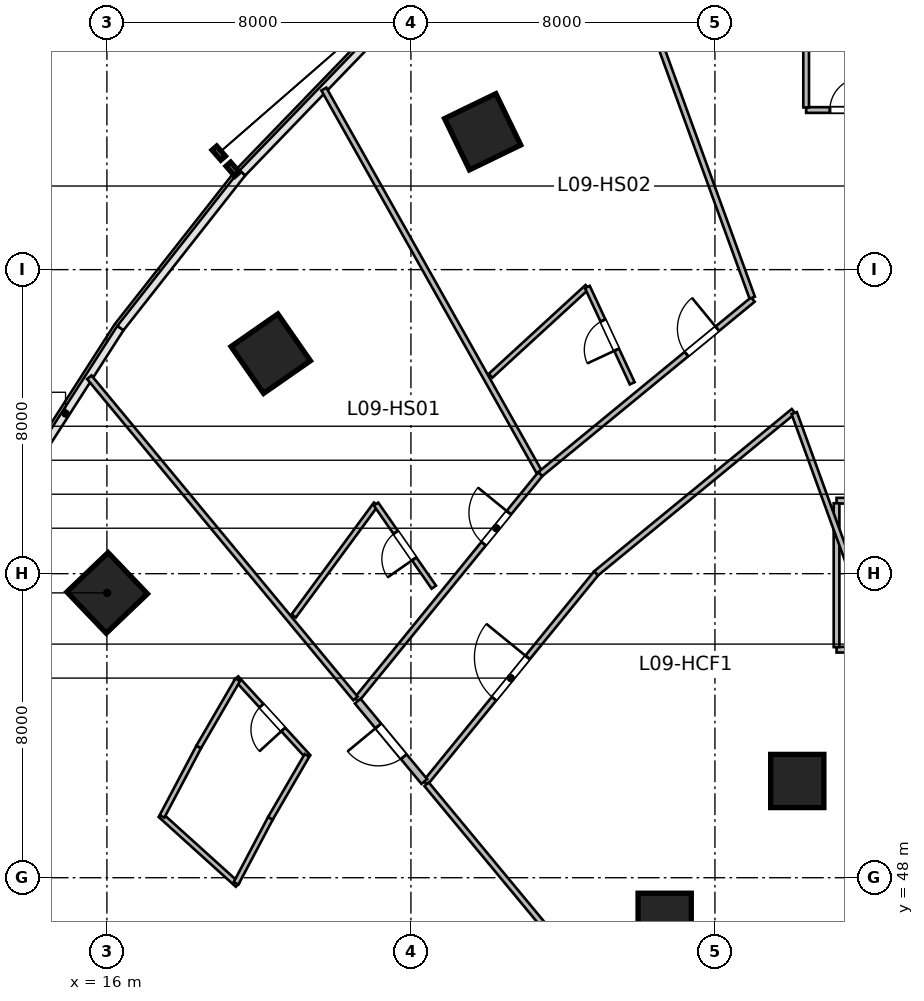
"""IFC4 building model, lengths in metres.
Left out: names, types, materials, properties, quantities, classifications, styles, units other than length and angle.
Written with IfcOpenShell. Run it as: python <this file> out.ifc"""

import sys

from ifc_helpers import new_model, si_unit, direction, frame, frame_2d, origin, origin_2d, place, context, subcontext, project, spatial, rectangle, circle, extrude, source, transform, mapped, element, fill, save


model = new_model("IFC4")
c1 = context("Model", 3, precision=1e-05, world=origin(), true_north=direction((0.0, 1.0)))
c2 = subcontext(c1, "Body", "Model", "MODEL_VIEW")
j1 = project(units=[si_unit("LENGTHUNIT", "METRE"), si_unit("PLANEANGLEUNIT", "RADIAN")], contexts=[c1])
p1 = place(None, origin())
s1 = spatial("IfcSite", under=j1, at=p1, CompositionType="ELEMENT")
p2 = place(p1, origin())
s2 = spatial("IfcBuilding", under=s1, at=p2, CompositionType="ELEMENT")
p3 = place(p2, frame((0.0, 0.0, 46.2)))
s3 = spatial("IfcBuildingStorey", under=s2, at=p3, CompositionType="ELEMENT", Elevation=46.2)
m1 = source(origin(), c2, "Body", "SweptSolid", [
    extrude(rectangle(XDim=1.5, YDim=1.5, at=origin_2d()), origin(), (0.0, 0.0, 1.0), 3.6),
])
p4 = place(p3, frame((16.007, 55.494, 0.0), z_axis=(0.0, 0.0, 1.0), x_axis=(-0.690756218984, 0.723087716626, 0.0)))
e1 = element("IfcColumn", 1, at=p4, inside=s3, PredefinedType="COLUMN", context=c2, shape_type="MappedRepresentation", body=[
    mapped(m1, transform((0.0, 0.0, 0.0), scale=1.0)),
])
m2 = source(origin(), c2, "Body", "SweptSolid", [
    extrude(circle(Radius=0.7, at=origin_2d()), origin(), (0.0, 0.0, 1.0), 3.6),
])
p5 = place(p3, frame((30.677, 46.892, 0.0), z_axis=(0.0, 0.0, 1.0), x_axis=(-0.571143442153, 0.820850271661, 0.0)))
e2 = element("IfcColumn", 2, at=p5, inside=s3, PredefinedType="COLUMN", context=c2, shape_type="MappedRepresentation", body=[
    mapped(m2, transform((0.0, 0.0, 0.0), scale=1.0)),
])
p6 = place(p3, frame((20.311, 61.789, 0.0), z_axis=(0.0, 0.0, 1.0), x_axis=(-0.571143442153, 0.820850271661, 0.0)))
e3 = element("IfcColumn", 3, at=p6, inside=s3, PredefinedType="COLUMN", context=c2, shape_type="MappedRepresentation", body=[
    mapped(m1, transform((0.0, 0.0, 0.0), scale=1.0)),
])
p7 = place(p3, frame((34.166, 50.545, 0.0), z_axis=(0.0, 0.0, 1.0), x_axis=(-0.436173672171, 0.899862504889, 0.0)))
e4 = element("IfcColumn", 4, at=p7, inside=s3, PredefinedType="COLUMN", context=c2, shape_type="MappedRepresentation", body=[
    mapped(m2, transform((0.0, 0.0, 0.0), scale=1.0)),
])
p8 = place(p3, frame((25.888, 67.627, 0.0), z_axis=(0.0, 0.0, 1.0), x_axis=(-0.436173672171, 0.899862504889, 0.0)))
e5 = element("IfcColumn", 5, at=p8, inside=s3, PredefinedType="COLUMN", context=c2, shape_type="MappedRepresentation", body=[
    mapped(m1, transform((0.0, 0.0, 0.0), scale=1.0)),
])
m3 = source(origin(), c2, "Body", "SweptSolid", [
    extrude(rectangle(XDim=2.1, YDim=0.15, at=frame_2d((1.05, 0.0))), origin(), (0.0, 0.0, 1.0), 3.36),
])
p9 = place(p3, frame((34.4, 68.2, 0.0), z_axis=(0.0, 0.0, 1.0), x_axis=(1.0, 0.0, 0.0)))
e6 = element("IfcWall", 6, at=p9, inside=s3, PredefinedType="PARTITIONING", context=c2, shape_type="MappedRepresentation", body=[
    mapped(m3, transform((0.0, 0.0, 0.0), scale=1.0)),
])
p10 = place(p9, frame((0.625, 0.0, 0.0)))
e7 = element("IfcOpeningElement", 7, at=p10, cuts=e6, PredefinedType="OPENING", context=c2, shape_type="SweptSolid", body=[
    extrude(rectangle(XDim=0.85, YDim=2.1, at=frame_2d((0.425, 1.05))), frame((0.0, 0.085, 0.0), z_axis=(0.0, -1.0, 0.0), x_axis=(1.0, 0.0, 0.0)), (0.0, 0.0, 1.0), 0.17),
])
m4 = source(origin(), c2, "Body", "SweptSolid", [
    extrude(rectangle(XDim=3.845, YDim=0.15, at=frame_2d((1.922, 0.0))), origin(), (0.0, 0.0, 1.0), 3.36),
])
p11 = place(p3, frame((34.4, 68.268, 0.0), z_axis=(0.0, 0.0, 1.0), x_axis=(0.0, 1.0, 0.0)))
e8 = element("IfcWall", 8, at=p11, inside=s3, PredefinedType="PARTITIONING", context=c2, shape_type="MappedRepresentation", body=[
    mapped(m4, transform((0.0, 0.0, 0.0), scale=1.0)),
])
m5 = source(origin(), c2, "Body", "SweptSolid", [
    extrude(rectangle(XDim=6.6, YDim=0.15, at=frame_2d((3.3, 0.0))), origin(), (0.0, 0.0, 1.0), 2.803),
])
p12 = place(p3, frame((35.2, 54.0, 0.0), z_axis=(0.0, 0.0, 1.0), x_axis=(1.0, 0.0, 0.0)))
e9 = element("IfcWall", 9, at=p12, inside=s3, PredefinedType="PARTITIONING", context=c2, shape_type="MappedRepresentation", body=[
    mapped(m5, transform((0.0, 0.0, 0.0), scale=1.0)),
])
m6 = source(origin(), c2, "Body", "SweptSolid", [
    extrude(rectangle(XDim=6.6, YDim=0.15, at=frame_2d((3.3, 0.0))), origin(), (0.0, 0.0, 1.0), 3.36),
])
p13 = place(p3, frame((35.2, 57.92, 0.0), z_axis=(0.0, 0.0, 1.0), x_axis=(1.0, 0.0, 0.0)))
e10 = element("IfcWall", 10, at=p13, inside=s3, PredefinedType="PARTITIONING", context=c2, shape_type="MappedRepresentation", body=[
    mapped(m6, transform((0.0, 0.0, 0.0), scale=1.0)),
])
p14 = place(p13, frame((2.85, 0.0, 0.0)))
e11 = element("IfcOpeningElement", 11, at=p14, cuts=e10, PredefinedType="OPENING", context=c2, shape_type="SweptSolid", body=[
    extrude(rectangle(XDim=0.9, YDim=2.1, at=frame_2d((0.45, 1.05))), frame((0.0, 0.085, 0.0), z_axis=(0.0, -1.0, 0.0), x_axis=(1.0, 0.0, 0.0)), (0.0, 0.0, 1.0), 0.17),
])
m7 = source(origin(), c2, "Body", "SweptSolid", [
    extrude(rectangle(XDim=3.785, YDim=0.15, at=frame_2d((1.893, 0.0))), origin(), (0.0, 0.0, 1.0), 3.36),
])
p15 = place(p3, frame((35.2, 54.067, 0.0), z_axis=(0.0, 0.0, 1.0), x_axis=(0.0, 1.0, 0.0)))
e12 = element("IfcWall", 12, at=p15, inside=s3, PredefinedType="PARTITIONING", context=c2, shape_type="MappedRepresentation", body=[
    mapped(m7, transform((0.0, 0.0, 0.0), scale=1.0)),
])
m8 = source(origin(), c2, "Body", "SweptSolid", [
    extrude(rectangle(XDim=7.659, YDim=0.15, at=frame_2d((3.829, 0.0))), origin(), (0.0, 0.0, 1.0), 3.36),
])
p16 = place(p3, frame((22.57, 52.683, 0.0), z_axis=(0.0, 0.0, 1.0), x_axis=(0.631489868862, 0.775384127723, 0.0)))
e13 = element("IfcWall", 13, at=p16, inside=s3, PredefinedType="PARTITIONING", context=c2, shape_type="MappedRepresentation", body=[
    mapped(m8, transform((0.0, 0.0, 0.0), scale=1.0)),
])
p17 = place(p16, frame((5.295, 0.0, 0.0)))
e14 = element("IfcOpeningElement", 14, at=p17, cuts=e13, PredefinedType="OPENING", context=c2, shape_type="SweptSolid", body=[
    extrude(rectangle(XDim=1.05, YDim=2.15, at=frame_2d((0.525, 1.075))), frame((0.0, 0.085, 0.0), z_axis=(0.0, -1.0, 0.0), x_axis=(1.0, 0.0, 0.0)), (0.0, 0.0, 1.0), 0.17),
])
m9 = source(origin(), c2, "Body", "SweptSolid", [
    extrude(rectangle(XDim=10.975, YDim=0.15, at=frame_2d((5.487, 0.0))), origin(), (0.0, 0.0, 1.0), 3.36),
])
p18 = place(p3, frame((22.54, 52.719, 0.0), z_axis=(0.0, 0.0, 1.0), x_axis=(-0.638125265812, 0.769932558821, 0.0)))
e15 = element("IfcWall", 15, at=p18, inside=s3, PredefinedType="PARTITIONING", context=c2, shape_type="MappedRepresentation", body=[
    mapped(m9, transform((0.0, 0.0, 0.0), scale=1.0)),
])
m10 = source(origin(), c2, "Body", "SweptSolid", [
    extrude(rectangle(XDim=11.573, YDim=0.15, at=frame_2d((5.786, 0.0))), origin(), (0.0, 0.0, 1.0), 3.36),
])
p19 = place(p3, frame((27.382, 58.664, 0.0), z_axis=(0.0, 0.0, 1.0), x_axis=(-0.490161073951, 0.871631872744, 0.0)))
e16 = element("IfcWall", 16, at=p19, inside=s3, PredefinedType="PARTITIONING", context=c2, shape_type="MappedRepresentation", body=[
    mapped(m10, transform((0.0, 0.0, 0.0), scale=1.0)),
])
m11 = source(origin(), c2, "Body", "SweptSolid", [
    extrude(rectangle(XDim=3.656, YDim=0.14, at=frame_2d((1.828, 0.0))), origin(), (0.0, 0.0, 1.0), 3.36),
])
p20 = place(p3, frame((20.915, 54.886, 0.0), z_axis=(0.0, 0.0, 1.0), x_axis=(0.592700141555, 0.805423206892, 0.0)))
e17 = element("IfcWall", 17, at=p20, inside=s3, PredefinedType="PARTITIONING", context=c2, shape_type="MappedRepresentation", body=[
    mapped(m11, transform((0.0, 0.0, 0.0), scale=1.0)),
])
m12 = source(origin(), c2, "Body", "SweptSolid", [
    extrude(rectangle(XDim=2.663, YDim=0.14, at=frame_2d((1.332, 0.0))), origin(), (0.0, 0.0, 1.0), 2.644),
])
p21 = place(p3, frame((24.603, 55.645, 0.0), z_axis=(0.0, 0.0, 1.0), x_axis=(-0.570905989724, 0.821015438891, 0.0)))
e18 = element("IfcWall", 18, at=p21, inside=s3, PredefinedType="PARTITIONING", context=c2, shape_type="MappedRepresentation", body=[
    mapped(m12, transform((0.0, 0.0, 0.0), scale=1.0)),
])
p22 = place(p21, frame((0.906, 0.0, 0.0)))
e19 = element("IfcOpeningElement", 19, at=p22, cuts=e18, PredefinedType="OPENING", context=c2, shape_type="SweptSolid", body=[
    extrude(rectangle(XDim=0.85, YDim=2.05, at=frame_2d((0.425, 1.025))), frame((0.0, 0.08, 0.0), z_axis=(0.0, -1.0, 0.0), x_axis=(1.0, 0.0, 0.0)), (0.0, 0.0, 1.0), 0.16),
])
m13 = source(origin(), c2, "Body", "SweptSolid", [
    extrude(rectangle(XDim=7.237, YDim=0.15, at=frame_2d((3.618, 0.0))), origin(), (0.0, 0.0, 1.0), 3.36),
])
p23 = place(p3, frame((27.406, 58.621, 0.0), z_axis=(0.0, 0.0, 1.0), x_axis=(0.772813707793, 0.634632943557, 0.0)))
e20 = element("IfcWall", 20, at=p23, inside=s3, PredefinedType="PARTITIONING", context=c2, shape_type="MappedRepresentation", body=[
    mapped(m13, transform((0.0, 0.0, 0.0), scale=1.0)),
])
p24 = place(p23, frame((4.975, 0.0, 0.0)))
e21 = element("IfcOpeningElement", 21, at=p24, cuts=e20, PredefinedType="OPENING", context=c2, shape_type="SweptSolid", body=[
    extrude(rectangle(XDim=1.05, YDim=2.15, at=frame_2d((0.525, 1.075))), frame((0.0, 0.085, 0.0), z_axis=(0.0, -1.0, 0.0), x_axis=(1.0, 0.0, 0.0)), (0.0, 0.0, 1.0), 0.17),
])
m14 = source(origin(), c2, "Body", "SweptSolid", [
    extrude(rectangle(XDim=12.088, YDim=0.15, at=frame_2d((6.044, 0.0))), origin(), (0.0, 0.0, 1.0), 3.36),
])
p25 = place(p3, frame((32.981, 63.262, 0.0), z_axis=(0.0, 0.0, 1.0), x_axis=(-0.34203007529, 0.939689005787, 0.0)))
e22 = element("IfcWall", 22, at=p25, inside=s3, PredefinedType="PARTITIONING", context=c2, shape_type="MappedRepresentation", body=[
    mapped(m14, transform((0.0, 0.0, 0.0), scale=1.0)),
])
m15 = source(origin(), c2, "Body", "SweptSolid", [
    extrude(rectangle(XDim=3.456, YDim=0.14, at=frame_2d((1.728, 0.0))), origin(), (0.0, 0.0, 1.0), 3.36),
])
p26 = place(p3, frame((26.095, 61.207, 0.0), z_axis=(0.0, 0.0, 1.0), x_axis=(0.736860870293, 0.676044420013, 0.0)))
e23 = element("IfcWall", 23, at=p26, inside=s3, PredefinedType="PARTITIONING", context=c2, shape_type="MappedRepresentation", body=[
    mapped(m15, transform((0.0, 0.0, 0.0), scale=1.0)),
])
m16 = source(origin(), c2, "Body", "SweptSolid", [
    extrude(rectangle(XDim=2.796, YDim=0.14, at=frame_2d((1.398, 0.0))), origin(), (0.0, 0.0, 1.0), 3.36),
])
p27 = place(p3, frame((29.823, 61.009, 0.0), z_axis=(0.0, 0.0, 1.0), x_axis=(-0.422316594955, 0.906448395456, 0.0)))
e24 = element("IfcWall", 24, at=p27, inside=s3, PredefinedType="PARTITIONING", context=c2, shape_type="MappedRepresentation", body=[
    mapped(m16, transform((0.0, 0.0, 0.0), scale=1.0)),
])
p28 = place(p27, frame((0.973, 0.0, 0.0)))
e25 = element("IfcOpeningElement", 25, at=p28, cuts=e24, PredefinedType="OPENING", context=c2, shape_type="SweptSolid", body=[
    extrude(rectangle(XDim=0.85, YDim=2.05, at=frame_2d((0.425, 1.025))), frame((0.0, 0.08, 0.0), z_axis=(0.0, -1.0, 0.0), x_axis=(1.0, 0.0, 0.0)), (0.0, 0.0, 1.0), 0.16),
])
m17 = source(origin(), c2, "Body", "SweptSolid", [
    extrude(rectangle(XDim=7.113, YDim=0.15, at=frame_2d((3.556, 0.0))), origin(), (0.0, 0.0, 1.0), 3.36),
])
p29 = place(p3, frame((24.383, 50.495, 0.0), z_axis=(0.0, 0.0, 1.0), x_axis=(0.63149032532, 0.775383755974, 0.0)))
e26 = element("IfcWall", 26, at=p29, inside=s3, PredefinedType="PARTITIONING", context=c2, shape_type="MappedRepresentation", body=[
    mapped(m17, transform((0.0, 0.0, 0.0), scale=1.0)),
])
p30 = place(p29, frame((2.856, 0.0, 0.0)))
e27 = element("IfcOpeningElement", 27, at=p30, cuts=e26, PredefinedType="OPENING", context=c2, shape_type="SweptSolid", body=[
    extrude(rectangle(XDim=1.4, YDim=2.15, at=frame_2d((0.7, 1.075))), frame((0.0, 0.085, 0.0), z_axis=(0.0, -1.0, 0.0), x_axis=(1.0, 0.0, 0.0)), (0.0, 0.0, 1.0), 0.17),
])
m18 = source(origin(), c2, "Body", "SweptSolid", [
    extrude(rectangle(XDim=6.721, YDim=0.15, at=frame_2d((3.361, 0.0))), origin(), (0.0, 0.0, 1.0), 3.36),
])
p31 = place(p3, frame((28.874, 56.01, 0.0), z_axis=(0.0, 0.0, 1.0), x_axis=(0.772828051199, 0.63461547671, 0.0)))
e28 = element("IfcWall", 28, at=p31, inside=s3, PredefinedType="PARTITIONING", context=c2, shape_type="MappedRepresentation", body=[
    mapped(m18, transform((0.0, 0.0, 0.0), scale=1.0)),
])
m19 = source(origin(), c2, "Body", "SweptSolid", [
    extrude(rectangle(XDim=11.053, YDim=0.15, at=frame_2d((5.527, 0.0))), origin(), (0.0, 0.0, 1.0), 2.984),
])
p32 = place(p3, frame((31.466, 41.949, 0.0), z_axis=(0.0, 0.0, 1.0), x_axis=(-0.638131235571, 0.769927611005, 0.0)))
e29 = element("IfcWall", 29, at=p32, inside=s3, PredefinedType="PARTITIONING", context=c2, shape_type="MappedRepresentation", body=[
    mapped(m19, transform((0.0, 0.0, 0.0), scale=1.0)),
])
m20 = source(origin(), c2, "Body", "SweptSolid", [
    extrude(rectangle(XDim=12.196, YDim=0.15, at=frame_2d((6.098, 0.0))), origin(), (0.0, 0.0, 1.0), 3.36),
])
p33 = place(p3, frame((38.258, 48.766, 0.0), z_axis=(0.0, 0.0, 1.0), x_axis=(-0.342022711534, 0.939691686031, 0.0)))
e30 = element("IfcWall", 30, at=p33, inside=s3, PredefinedType="PARTITIONING", context=c2, shape_type="MappedRepresentation", body=[
    mapped(m20, transform((0.0, 0.0, 0.0), scale=1.0)),
])
m21 = source(origin(), c2, "Body", "SweptSolid", [
    extrude(rectangle(XDim=2.748, YDim=0.195, at=frame_2d((1.374, 0.0))), origin(), (0.0, 0.0, 1.0), 3.36),
])
p34 = place(p3, frame((24.353, 50.531, 0.0), z_axis=(0.0, 0.0, 1.0), x_axis=(-0.638111168284, 0.769944242729, 0.0)))
e31 = element("IfcWall", 31, at=p34, inside=s3, PredefinedType="PARTITIONING", context=c2, shape_type="MappedRepresentation", body=[
    mapped(m21, transform((0.0, 0.0, 0.0), scale=1.0)),
])
p35 = place(p34, frame((0.849, 0.0, 0.0)))
e32 = element("IfcOpeningElement", 32, at=p35, cuts=e31, PredefinedType="OPENING", context=c2, shape_type="SweptSolid", body=[
    extrude(rectangle(XDim=1.05, YDim=2.15, at=frame_2d((0.525, 1.075))), frame((0.0, 0.107, 0.0), z_axis=(0.0, -1.0, 0.0), x_axis=(1.0, 0.0, 0.0)), (0.0, 0.0, 1.0), 0.215),
])
m22 = source(origin(), c2, "Body", "SweptSolid", [
    extrude(rectangle(XDim=2.812, YDim=0.14, at=frame_2d((1.406, 0.0))), origin(), (0.0, 0.0, 1.0), 3.36),
])
p36 = place(p3, frame((21.303, 51.177, 0.0), z_axis=(0.0, 0.0, 1.0), x_axis=(-0.675119025852, 0.737708818527, 0.0)))
e33 = element("IfcWall", 33, at=p36, inside=s3, PredefinedType="PARTITIONING", context=c2, shape_type="MappedRepresentation", body=[
    mapped(m22, transform((0.0, 0.0, 0.0), scale=1.0)),
])
p37 = place(p36, frame((0.981, 0.0, 0.0)))
e34 = element("IfcOpeningElement", 34, at=p37, cuts=e33, PredefinedType="OPENING", context=c2, shape_type="SweptSolid", body=[
    extrude(rectangle(XDim=0.85, YDim=2.05, at=frame_2d((0.425, 1.025))), frame((0.0, 0.08, 0.0), z_axis=(0.0, -1.0, 0.0), x_axis=(1.0, 0.0, 0.0)), (0.0, 0.0, 1.0), 0.16),
])
m23 = source(origin(), c2, "Body", "SweptSolid", [
    extrude(rectangle(XDim=2.738, YDim=0.14, at=frame_2d((1.369, 0.0))), origin(), (0.0, 0.0, 1.0), 3.36),
])
p38 = place(p3, frame((19.44, 47.814, 0.0), z_axis=(0.0, 0.0, 1.0), x_axis=(-0.741873676582, 0.670539669218, 0.0)))
e35 = element("IfcWall", 35, at=p38, inside=s3, PredefinedType="PARTITIONING", context=c2, shape_type="MappedRepresentation", body=[
    mapped(m23, transform((0.0, 0.0, 0.0), scale=1.0)),
])
m24 = source(origin(), c2, "Body", "SweptSolid", [
    extrude(rectangle(XDim=1.936, YDim=0.14, at=frame_2d((0.968, 0.0))), origin(), (0.0, 0.0, 1.0), 3.36),
])
p39 = place(p3, frame((19.398, 47.852, 0.0), z_axis=(0.0, 0.0, 1.0), x_axis=(0.467174971862, 0.884164886017, 0.0)))
e36 = element("IfcWall", 36, at=p39, inside=s3, PredefinedType="PARTITIONING", context=c2, shape_type="MappedRepresentation", body=[
    mapped(m24, transform((0.0, 0.0, 0.0), scale=1.0)),
])
m25 = source(origin(), c2, "Body", "SweptSolid", [
    extrude(rectangle(XDim=2.068, YDim=0.14, at=frame_2d((1.034, 0.0))), origin(), (0.0, 0.0, 1.0), 3.36),
])
p40 = place(p3, frame((17.45, 49.612, 0.0), z_axis=(0.0, 0.0, 1.0), x_axis=(0.467215057643, 0.884143704333, 0.0)))
e37 = element("IfcWall", 37, at=p40, inside=s3, PredefinedType="PARTITIONING", context=c2, shape_type="MappedRepresentation", body=[
    mapped(m25, transform((0.0, 0.0, 0.0), scale=1.0)),
])
m26 = source(origin(), c2, "Body", "SweptSolid", [
    extrude(rectangle(XDim=1.914, YDim=0.14, at=frame_2d((0.957, 0.0))), origin(), (0.0, 0.0, 1.0), 3.36),
])
p41 = place(p3, frame((20.303, 49.563, 0.0), z_axis=(0.0, 0.0, 1.0), x_axis=(0.502347790612, 0.864665656347, 0.0)))
e38 = element("IfcWall", 38, at=p41, inside=s3, PredefinedType="PARTITIONING", context=c2, shape_type="MappedRepresentation", body=[
    mapped(m26, transform((0.0, 0.0, 0.0), scale=1.0)),
])
m27 = source(origin(), c2, "Body", "SweptSolid", [
    extrude(rectangle(XDim=2.045, YDim=0.14, at=frame_2d((1.022, 0.0))), origin(), (0.0, 0.0, 1.0), 3.36),
])
p42 = place(p3, frame((18.416, 51.441, 0.0), z_axis=(0.0, 0.0, 1.0), x_axis=(0.5023112139, 0.864686905411, 0.0)))
e39 = element("IfcWall", 39, at=p42, inside=s3, PredefinedType="PARTITIONING", context=c2, shape_type="MappedRepresentation", body=[
    mapped(m27, transform((0.0, 0.0, 0.0), scale=1.0)),
])
m28 = source(origin(), c2, "Body", "SweptSolid", [
    extrude(rectangle(XDim=0.85, YDim=2.1, at=frame_2d((0.425, 1.05))), frame((0.0, 0.025, 0.0), z_axis=(0.0, -1.0, 0.0), x_axis=(1.0, 0.0, 0.0)), (0.0, 0.0, 1.0), 0.05),
])
p43 = place(p10, origin())
e40 = element("IfcDoor", 40, at=p43, inside=s3, OperationType="SINGLE_SWING_RIGHT", PredefinedType="DOOR", context=c2, shape_type="MappedRepresentation", body=[
    mapped(m28, transform((0.0, 0.0, 0.0), scale=1.0)),
])
fill(e7, e40)
m29 = source(origin(), c2, "Body", "SweptSolid", [
    extrude(rectangle(XDim=1.05, YDim=2.15, at=frame_2d((0.525, 1.075))), frame((0.0, 0.025, 0.0), z_axis=(0.0, -1.0, 0.0), x_axis=(1.0, 0.0, 0.0)), (0.0, 0.0, 1.0), 0.05),
])
p44 = place(p17, origin())
e41 = element("IfcDoor", 41, at=p44, inside=s3, OperationType="SINGLE_SWING_RIGHT", PredefinedType="DOOR", context=c2, shape_type="MappedRepresentation", body=[
    mapped(m29, transform((0.0, 0.0, 0.0), scale=1.0)),
])
fill(e14, e41)
m30 = source(origin(), c2, "Body", "SweptSolid", [
    extrude(rectangle(XDim=0.85, YDim=2.05, at=frame_2d((0.425, 1.025))), frame((0.0, 0.025, 0.0), z_axis=(0.0, -1.0, 0.0), x_axis=(1.0, 0.0, 0.0)), (0.0, 0.0, 1.0), 0.05),
])
p45 = place(p22, origin())
e42 = element("IfcDoor", 42, at=p45, inside=s3, OperationType="SINGLE_SWING_LEFT", PredefinedType="DOOR", context=c2, shape_type="MappedRepresentation", body=[
    mapped(m30, transform((0.0, 0.0, 0.0), scale=1.0)),
])
fill(e19, e42)
p46 = place(p24, origin())
e43 = element("IfcDoor", 43, at=p46, inside=s3, OperationType="SINGLE_SWING_RIGHT", PredefinedType="DOOR", context=c2, shape_type="MappedRepresentation", body=[
    mapped(m29, transform((0.0, 0.0, 0.0), scale=1.0)),
])
fill(e21, e43)
p47 = place(p28, origin())
e44 = element("IfcDoor", 44, at=p47, inside=s3, OperationType="SINGLE_SWING_LEFT", PredefinedType="DOOR", context=c2, shape_type="MappedRepresentation", body=[
    mapped(m30, transform((0.0, 0.0, 0.0), scale=1.0)),
])
fill(e25, e44)
m31 = source(origin(), c2, "Body", "SweptSolid", [
    extrude(rectangle(XDim=1.4, YDim=2.15, at=frame_2d((0.7, 1.075))), frame((0.0, 0.025, 0.0), z_axis=(0.0, -1.0, 0.0), x_axis=(1.0, 0.0, 0.0)), (0.0, 0.0, 1.0), 0.05),
])
p48 = place(p30, origin())
e45 = element("IfcDoor", 45, at=p48, inside=s3, OperationType="SINGLE_SWING_RIGHT", PredefinedType="DOOR", context=c2, shape_type="MappedRepresentation", body=[
    mapped(m31, transform((0.0, 0.0, 0.0), scale=1.0)),
])
fill(e27, e45)
p49 = place(p35, origin())
e46 = element("IfcDoor", 46, at=p49, inside=s3, OperationType="SINGLE_SWING_RIGHT", PredefinedType="DOOR", context=c2, shape_type="MappedRepresentation", body=[
    mapped(m29, transform((0.0, 0.0, 0.0), scale=1.0)),
])
fill(e32, e46)
p50 = place(p37, origin())
e47 = element("IfcDoor", 47, at=p50, inside=s3, OperationType="SINGLE_SWING_LEFT", PredefinedType="DOOR", context=c2, shape_type="MappedRepresentation", body=[
    mapped(m30, transform((0.0, 0.0, 0.0), scale=1.0)),
])
fill(e34, e47)
save(model, sys.argv[1])
